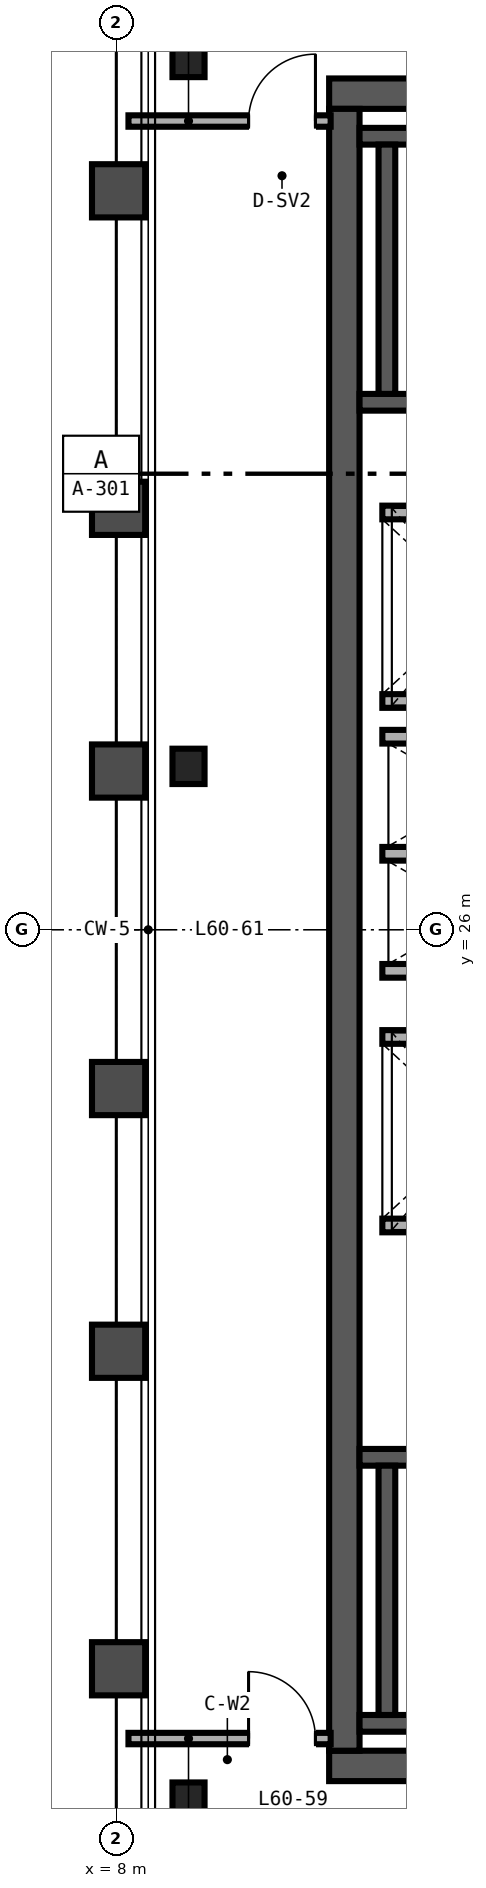
"""IFC4 building model, lengths in metres.
Left out: names, types, materials, properties, quantities, classifications, styles, units other than length and angle.
Written with IfcOpenShell. Run it as: python <this file> out.ifc"""

import sys

from ifc_helpers import new_model, si_unit, direction, frame, frame_2d, origin, origin_2d, place, context, subcontext, project, spatial, rectangle, i_section, extrude, source, transform, mapped, element, fill, save


model = new_model("IFC4")
c1 = context("Model", 3, precision=1e-05, world=origin(), true_north=direction((0.0, 1.0)))
c2 = subcontext(c1, "Body", "Model", "MODEL_VIEW")
j1 = project(units=[si_unit("LENGTHUNIT", "METRE"), si_unit("PLANEANGLEUNIT", "RADIAN")], contexts=[c1])
p1 = place(None, origin())
s1 = spatial("IfcSite", under=j1, at=p1, CompositionType="ELEMENT")
p2 = place(p1, origin())
s2 = spatial("IfcBuilding", under=s1, at=p2, CompositionType="ELEMENT")
p3 = place(p2, frame((0.0, 0.0, 240.0)))
s3 = spatial("IfcBuildingStorey", under=s2, at=p3, CompositionType="ELEMENT", Elevation=240.0)
p4 = place(p3, frame((10.8, 15.0, 0.0), z_axis=(0.0, 0.0, 1.0), x_axis=(1.0, 0.0, 0.0)))
e1 = element("IfcWall", 1, at=p4, inside=s3, PredefinedType="SHEAR", context=c2, shape_type="SweptSolid", body=[
    extrude(rectangle(XDim=12.4, YDim=0.4, at=frame_2d((6.2, 0.0))), origin(), (0.0, 0.0, 1.0), 3.38),
])
p5 = place(p4, frame((8.78, 0.0, 0.0)))
e2 = element("IfcOpeningElement", 2, at=p5, cuts=e1, PredefinedType="OPENING", context=c2, shape_type="SweptSolid", body=[
    extrude(rectangle(XDim=1.0, YDim=2.15, at=frame_2d((0.5, 1.075))), frame((0.0, 0.21, 0.0), z_axis=(0.0, -1.0, 0.0), x_axis=(1.0, 0.0, 0.0)), (0.0, 0.0, 1.0), 0.42),
])
p6 = place(p3, frame((10.8, 37.0, 0.0), z_axis=(0.0, 0.0, 1.0), x_axis=(1.0, 0.0, 0.0)))
e3 = element("IfcWall", 3, at=p6, inside=s3, PredefinedType="SHEAR", context=c2, shape_type="SweptSolid", body=[
    extrude(rectangle(XDim=12.4, YDim=0.4, at=frame_2d((6.2, 0.0))), origin(), (0.0, 0.0, 1.0), 3.38),
])
p7 = place(p6, frame((8.78, 0.0, 0.0)))
e4 = element("IfcOpeningElement", 4, at=p7, cuts=e3, PredefinedType="OPENING", context=c2, shape_type="SweptSolid", body=[
    extrude(rectangle(XDim=1.0, YDim=2.15, at=frame_2d((0.5, 1.075))), frame((0.0, 0.21, 0.0), z_axis=(0.0, -1.0, 0.0), x_axis=(1.0, 0.0, 0.0)), (0.0, 0.0, 1.0), 0.42),
])
p8 = place(p3, frame((11.0, 15.2, 0.0), z_axis=(0.0, 0.0, 1.0), x_axis=(0.0, 1.0, 0.0)))
e5 = element("IfcWall", 5, at=p8, inside=s3, PredefinedType="SHEAR", context=c2, shape_type="SweptSolid", body=[
    extrude(rectangle(XDim=21.6, YDim=0.4, at=frame_2d((10.8, 0.0))), origin(), (0.0, 0.0, 1.0), 3.38),
])
p9 = place(p3, frame((11.2, 15.56, 0.0), z_axis=(0.0, 0.0, 1.0), x_axis=(1.0, 0.0, 0.0)))
e6 = element("IfcWall", 6, at=p9, inside=s3, PredefinedType="SHEAR", context=c2, shape_type="SweptSolid", body=[
    extrude(rectangle(XDim=8.11, YDim=0.22, at=frame_2d((4.055, 0.0))), origin(), (0.0, 0.0, 1.0), 3.4),
])
p10 = place(p3, frame((11.2, 19.06, 0.0), z_axis=(0.0, 0.0, 1.0), x_axis=(1.0, 0.0, 0.0)))
e7 = element("IfcWall", 7, at=p10, inside=s3, PredefinedType="SHEAR", context=c2, shape_type="SweptSolid", body=[
    extrude(rectangle(XDim=8.11, YDim=0.22, at=frame_2d((4.055, 0.0))), origin(), (0.0, 0.0, 1.0), 3.4),
])
p11 = place(p10, frame((0.72, 0.0, 0.0)))
e8 = element("IfcOpeningElement", 8, at=p11, cuts=e7, PredefinedType="OPENING", context=c2, shape_type="SweptSolid", body=[
    extrude(rectangle(XDim=1.05, YDim=2.15, at=frame_2d((0.525, 1.075))), frame((0.0, 0.12, 0.0), z_axis=(0.0, -1.0, 0.0), x_axis=(1.0, 0.0, 0.0)), (0.0, 0.0, 1.0), 0.24),
])
p12 = place(p3, frame((11.56, 15.67, 0.0), z_axis=(0.0, 0.0, 1.0), x_axis=(0.0, 1.0, 0.0)))
e9 = element("IfcWall", 9, at=p12, inside=s3, PredefinedType="SHEAR", context=c2, shape_type="SweptSolid", body=[
    extrude(rectangle(XDim=3.28, YDim=0.22, at=frame_2d((1.64, 0.0))), origin(), (0.0, 0.0, 1.0), 3.4),
])
p13 = place(p3, frame((11.2, 32.94, 0.0), z_axis=(0.0, 0.0, 1.0), x_axis=(1.0, 0.0, 0.0)))
e10 = element("IfcWall", 10, at=p13, inside=s3, PredefinedType="SHEAR", context=c2, shape_type="SweptSolid", body=[
    extrude(rectangle(XDim=8.11, YDim=0.22, at=frame_2d((4.055, 0.0))), origin(), (0.0, 0.0, 1.0), 3.4),
])
p14 = place(p13, frame((0.72, 0.0, 0.0)))
e11 = element("IfcOpeningElement", 11, at=p14, cuts=e10, PredefinedType="OPENING", context=c2, shape_type="SweptSolid", body=[
    extrude(rectangle(XDim=1.05, YDim=2.15, at=frame_2d((0.525, 1.075))), frame((0.0, 0.12, 0.0), z_axis=(0.0, -1.0, 0.0), x_axis=(1.0, 0.0, 0.0)), (0.0, 0.0, 1.0), 0.24),
])
p15 = place(p3, frame((11.2, 36.44, 0.0), z_axis=(0.0, 0.0, 1.0), x_axis=(1.0, 0.0, 0.0)))
e12 = element("IfcWall", 12, at=p15, inside=s3, PredefinedType="SHEAR", context=c2, shape_type="SweptSolid", body=[
    extrude(rectangle(XDim=8.11, YDim=0.22, at=frame_2d((4.055, 0.0))), origin(), (0.0, 0.0, 1.0), 3.4),
])
p16 = place(p3, frame((11.56, 33.05, 0.0), z_axis=(0.0, 0.0, 1.0), x_axis=(0.0, 1.0, 0.0)))
e13 = element("IfcWall", 13, at=p16, inside=s3, PredefinedType="SHEAR", context=c2, shape_type="SweptSolid", body=[
    extrude(rectangle(XDim=3.28, YDim=0.22, at=frame_2d((1.64, 0.0))), origin(), (0.0, 0.0, 1.0), 3.4),
])
m1 = source(origin(), c2, "Body", "SweptSolid", [
    extrude(i_section(OverallWidth=0.422, OverallDepth=0.465, WebThickness=0.045, FlangeThickness=0.073, FilletRadius=0.025, at=origin_2d()), origin(), (0.0, 0.0, 1.0), 3.38),
])
for number, where, z_axis, x_axis in (
    (14, (8.95, 14.55, 0.0), (0.0, 0.0, 1.0), (1.0, 0.0, 0.0)),
    (15, (8.95, 28.15, 0.0), (0.0, 0.0, 1.0), (1.0, 0.0, 0.0)),
    (16, (8.95, 37.45, 0.0), (0.0, 0.0, 1.0), (1.0, 0.0, 0.0)),
):
    element("IfcColumn", number, at=place(p3, frame(where, z_axis=z_axis, x_axis=x_axis)), inside=s3, PredefinedType="COLUMN", context=c2, shape_type="MappedRepresentation", body=[
        mapped(m1, transform((0.0, 0.0, 0.0), scale=1.0)),
    ])
for number, where, z_axis, x_axis in (
    (17, (11.5, 22.11, 0.0), (0.0, 0.0, 1.0), (1.0, 0.0, 0.0)),
    (18, (11.5, 24.59, 0.0), (0.0, 0.0, 1.0), (1.0, 0.0, 0.0)),
    (19, (11.5, 29.01, 0.0), (0.0, 0.0, 1.0), (1.0, 0.0, 0.0)),
    (20, (11.5, 31.49, 0.0), (0.0, 0.0, 1.0), (1.0, 0.0, 0.0)),
):
    element("IfcWall", number, at=place(p3, frame(where, z_axis=z_axis, x_axis=x_axis)), inside=s3, PredefinedType="SOLIDWALL", context=c2, shape_type="SweptSolid", body=[
        extrude(rectangle(XDim=2.5, YDim=0.18, at=frame_2d((1.25, 0.0))), origin(), (0.0, 0.0, 1.0), 3.38),
    ])
for number, where, z_axis, x_axis in (
    (21, (11.5, 25.46, 0.0), (0.0, 0.0, 1.0), (1.0, 0.0, 0.0)),
    (22, (11.5, 27.0, 0.0), (0.0, 0.0, 1.0), (1.0, 0.0, 0.0)),
    (23, (11.5, 28.54, 0.0), (0.0, 0.0, 1.0), (1.0, 0.0, 0.0)),
):
    element("IfcWall", number, at=place(p3, frame(where, z_axis=z_axis, x_axis=x_axis)), inside=s3, PredefinedType="SOLIDWALL", context=c2, shape_type="SweptSolid", body=[
        extrude(rectangle(XDim=2.51, YDim=0.18, at=frame_2d((1.255, 0.0))), origin(), (0.0, 0.0, 1.0), 3.38),
    ])
p17 = place(p3, frame((8.16, 15.36, 0.0), z_axis=(0.0, 0.0, 1.0), x_axis=(1.0, 0.0, 0.0)))
e24 = element("IfcWall", 24, at=p17, inside=s3, PredefinedType="PARTITIONING", context=c2, shape_type="SweptSolid", body=[
    extrude(rectangle(XDim=2.66, YDim=0.15, at=frame_2d((1.33, 0.0))), origin(), (0.0, 0.0, 1.0), 2.601),
])
p18 = place(p17, frame((1.58, 0.0, 0.0)))
e25 = element("IfcOpeningElement", 25, at=p18, cuts=e24, PredefinedType="OPENING", context=c2, shape_type="SweptSolid", body=[
    extrude(rectangle(XDim=0.88, YDim=2.15, at=frame_2d((0.44, 1.075))), frame((0.0, 0.085, 0.0), z_axis=(0.0, -1.0, 0.0), x_axis=(1.0, 0.0, 0.0)), (0.0, 0.0, 1.0), 0.17),
])
p19 = place(p3, frame((8.16, 36.64, 0.0), z_axis=(0.0, 0.0, 1.0), x_axis=(1.0, 0.0, 0.0)))
e26 = element("IfcWall", 26, at=p19, inside=s3, PredefinedType="PARTITIONING", context=c2, shape_type="SweptSolid", body=[
    extrude(rectangle(XDim=2.66, YDim=0.15, at=frame_2d((1.33, 0.0))), origin(), (0.0, 0.0, 1.0), 2.763),
])
p20 = place(p19, frame((1.58, 0.0, 0.0)))
e27 = element("IfcOpeningElement", 27, at=p20, cuts=e26, PredefinedType="OPENING", context=c2, shape_type="SweptSolid", body=[
    extrude(rectangle(XDim=0.88, YDim=2.15, at=frame_2d((0.44, 1.075))), frame((0.0, 0.085, 0.0), z_axis=(0.0, -1.0, 0.0), x_axis=(1.0, 0.0, 0.0)), (0.0, 0.0, 1.0), 0.17),
])
m2 = source(origin(), c2, "Body", "SweptSolid", [
    extrude(rectangle(XDim=0.88, YDim=2.15, at=frame_2d((0.44, 1.075))), frame((0.0, 0.025, 0.0), z_axis=(0.0, -1.0, 0.0), x_axis=(1.0, 0.0, 0.0)), (0.0, 0.0, 1.0), 0.05),
])
p21 = place(p18, origin())
e28 = element("IfcDoor", 28, at=p21, inside=s3, OperationType="SINGLE_SWING_LEFT", PredefinedType="DOOR", context=c2, shape_type="MappedRepresentation", body=[
    mapped(m2, transform((0.0, 0.0, 0.0), scale=1.0)),
])
fill(e25, e28)
p22 = place(p20, origin())
e29 = element("IfcDoor", 29, at=p22, inside=s3, OperationType="SINGLE_SWING_RIGHT", PredefinedType="DOOR", context=c2, shape_type="MappedRepresentation", body=[
    mapped(m2, transform((0.0, 0.0, 0.0), scale=1.0)),
])
fill(e27, e29)
save(model, sys.argv[1])
